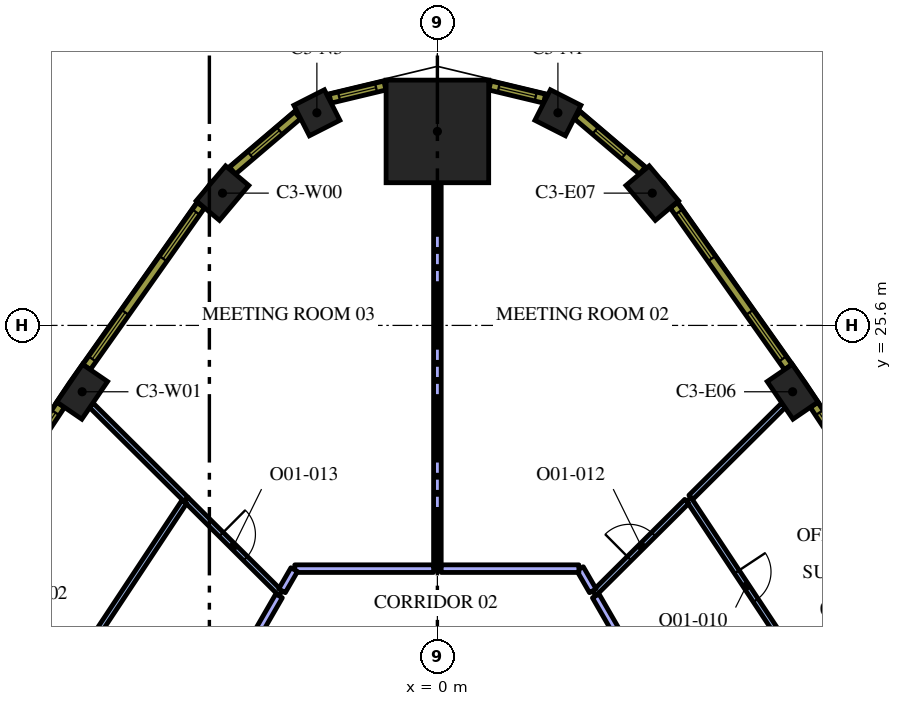
"""IFC4 building model, lengths in metres.
Left out: names, types, materials, properties, quantities, classifications, styles, units other than length and angle.
Written with IfcOpenShell. Run it as: python <this file> out.ifc"""

import sys

from ifc_helpers import new_model, si_unit, direction, frame, frame_2d, origin, origin_2d, place, context, subcontext, project, spatial, rectangle, extrude, element, fill, save


model = new_model("IFC4")
c1 = context("Model", 3, precision=1e-05, world=origin(), true_north=direction((0.0, 1.0)))
c2 = subcontext(c1, "Body", "Model", "MODEL_VIEW")
j1 = project(units=[si_unit("LENGTHUNIT", "METRE"), si_unit("PLANEANGLEUNIT", "RADIAN")], contexts=[c1])
p1 = place(None, origin())
s1 = spatial("IfcSite", under=j1, at=p1, CompositionType="ELEMENT")
p2 = place(p1, origin())
s2 = spatial("IfcBuilding", under=s1, at=p2, CompositionType="ELEMENT")
p3 = place(p2, frame((0.0, 0.0, 141.6)))
s3 = spatial("IfcBuildingStorey", under=s2, at=p3, CompositionType="ELEMENT", Elevation=141.6)
p4 = place(p3, frame((0.0, 30.704, 0.0), z_axis=(0.0, 0.0, 1.0), x_axis=(0.0, 1.0, 0.0)))
e1 = element("IfcColumn", 1, at=p4, inside=s3, PredefinedType="COLUMN", context=c2, shape_type="SweptSolid", body=[
    extrude(rectangle(XDim=2.7, YDim=2.7, at=origin_2d()), origin(), (0.0, 0.0, 1.0), 4.2),
])
for number, where, z_axis, x_axis in (
    (2, (9.348, 23.854, 0.0), (0.0, 0.0, 1.0), (-0.565, 0.825, 0.0)),
    (3, (5.654, 29.081, 0.0), (0.0, 0.0, 1.0), (-0.644, 0.765, 0.0)),
):
    element("IfcColumn", number, at=place(p3, frame(where, z_axis=z_axis, x_axis=x_axis)), inside=s3, PredefinedType="COLUMN", context=c2, shape_type="SweptSolid", body=[
        extrude(rectangle(XDim=1.2, YDim=0.8, at=origin_2d()), origin(), (0.0, 0.0, 1.0), 4.2),
    ])
for number, where, z_axis, x_axis in (
    (4, (3.171, 31.195, 0.0), (0.0, 0.0, 1.0), (-0.891, 0.453, 0.0)),
    (5, (-3.171, 31.195, 0.0), (0.0, 0.0, 1.0), (-0.891, -0.453, 0.0)),
):
    element("IfcColumn", number, at=place(p3, frame(where, z_axis=z_axis, x_axis=x_axis)), inside=s3, PredefinedType="COLUMN", context=c2, shape_type="SweptSolid", body=[
        extrude(rectangle(XDim=0.9, YDim=0.9, at=origin_2d()), origin(), (0.0, 0.0, 1.0), 4.2),
    ])
for number, where, z_axis, x_axis in (
    (6, (-5.654, 29.081, 0.0), (0.0, 0.0, 1.0), (-0.644, -0.765, 0.0)),
    (7, (-9.348, 23.854, 0.0), (0.0, 0.0, 1.0), (-0.565, -0.825, 0.0)),
):
    element("IfcColumn", number, at=place(p3, frame(where, z_axis=z_axis, x_axis=x_axis)), inside=s3, PredefinedType="COLUMN", context=c2, shape_type="SweptSolid", body=[
        extrude(rectangle(XDim=1.2, YDim=0.8, at=origin_2d()), origin(), (0.0, 0.0, 1.0), 4.2),
    ])
p5 = place(p3, frame((6.616, 21.024, 0.0), z_axis=(0.0, 0.0, 1.0), x_axis=(0.551915124006, -0.833900291338, 0.0)))
e8 = element("IfcWall", 8, at=p5, inside=s3, PredefinedType="PARTITIONING", context=c2, shape_type="SweptSolid", body=[
    extrude(rectangle(XDim=5.488, YDim=0.15, at=frame_2d((2.744, 0.0))), origin(), (0.0, 0.0, 1.0), 3.15),
])
p6 = place(p5, frame((2.288, 0.0, 0.0)))
e9 = element("IfcOpeningElement", 9, at=p6, cuts=e8, PredefinedType="OPENING", context=c2, shape_type="SweptSolid", body=[
    extrude(rectangle(XDim=0.9, YDim=2.1, at=frame_2d((0.45, 1.05))), frame((0.0, 0.085, 0.0), z_axis=(0.0, -1.0, 0.0), x_axis=(1.0, 0.0, 0.0)), (0.0, 0.0, 1.0), 0.17),
])
p7 = place(p3, frame((6.67, 21.078, 0.0), z_axis=(0.0, 0.0, 1.0), x_axis=(0.709236178776, 0.704970951681, 0.0)))
e10 = element("IfcWall", 10, at=p7, inside=s3, PredefinedType="PARTITIONING", context=c2, shape_type="SweptSolid", body=[
    extrude(rectangle(XDim=3.434, YDim=0.15, at=frame_2d((1.717, 0.0))), origin(), (0.0, 0.0, 1.0), 3.15),
])
p8 = place(p3, frame((4.128, 18.55, 0.0), z_axis=(0.0, 0.0, 1.0), x_axis=(0.709237676072, 0.704969445324, 0.0)))
e11 = element("IfcWall", 11, at=p8, inside=s3, PredefinedType="PARTITIONING", context=c2, shape_type="SweptSolid", body=[
    extrude(rectangle(XDim=3.432, YDim=0.15, at=frame_2d((1.716, 0.0))), origin(), (0.0, 0.0, 1.0), 3.15),
])
p9 = place(p8, frame((1.3, 0.0, 0.0)))
e12 = element("IfcOpeningElement", 12, at=p9, cuts=e11, PredefinedType="OPENING", context=c2, shape_type="SweptSolid", body=[
    extrude(rectangle(XDim=0.9, YDim=2.1, at=frame_2d((0.45, 1.05))), frame((0.0, 0.085, 0.0), z_axis=(0.0, -1.0, 0.0), x_axis=(1.0, 0.0, 0.0)), (0.0, 0.0, 1.0), 0.17),
])
p10 = place(p3, frame((8.611, 10.785, 0.0), z_axis=(0.0, 0.0, 1.0), x_axis=(-0.499987928593, 0.866032373102, 0.0)))
e13 = element("IfcWall", 13, at=p10, inside=s3, PredefinedType="PARTITIONING", context=c2, shape_type="SweptSolid", body=[
    extrude(rectangle(XDim=8.889, YDim=0.2, at=frame_2d((4.445, 0.0))), origin(), (0.0, 0.0, 1.0), 3.15),
])
p11 = place(p3, frame((0.0, 19.2, 0.0), z_axis=(0.0, 0.0, 1.0), x_axis=(0.0, 1.0, 0.0)))
e14 = element("IfcWall", 14, at=p11, inside=s3, PredefinedType="PARTITIONING", context=c2, shape_type="SweptSolid", body=[
    extrude(rectangle(XDim=10.154, YDim=0.2, at=frame_2d((5.077, 0.0))), origin(), (0.0, 0.0, 1.0), 3.15),
])
p12 = place(p3, frame((4.089, 18.617, 0.0), z_axis=(0.0, 0.0, 1.0), x_axis=(-0.500120377296, 0.865955892764, 0.0)))
e15 = element("IfcWall", 15, at=p12, inside=s3, PredefinedType="PARTITIONING", context=c2, shape_type="SweptSolid", body=[
    extrude(rectangle(XDim=0.673, YDim=0.2, at=frame_2d((0.336, 0.0))), origin(), (0.0, 0.0, 1.0), 3.15),
])
p13 = place(p3, frame((3.723, 19.2, 0.0), z_axis=(0.0, 0.0, 1.0), x_axis=(-1.0, 0.0, 0.0)))
e16 = element("IfcWall", 16, at=p13, inside=s3, PredefinedType="PARTITIONING", context=c2, shape_type="SweptSolid", body=[
    extrude(rectangle(XDim=3.623, YDim=0.2, at=frame_2d((1.812, 0.0))), origin(), (0.0, 0.0, 1.0), 3.15),
])
p14 = place(p3, frame((-6.613, 21.021, 0.0), z_axis=(0.0, 0.0, 1.0), x_axis=(-0.709222036241, 0.704985179497, 0.0)))
e17 = element("IfcWall", 17, at=p14, inside=s3, PredefinedType="PARTITIONING", context=c2, shape_type="SweptSolid", body=[
    extrude(rectangle(XDim=3.515, YDim=0.15, at=frame_2d((1.757, 0.0))), origin(), (0.0, 0.0, 1.0), 3.15),
])
p15 = place(p3, frame((-6.619, 21.027, 0.0), z_axis=(0.0, 0.0, 1.0), x_axis=(0.709188943058, -0.705018470002, 0.0)))
e18 = element("IfcWall", 18, at=p15, inside=s3, PredefinedType="PARTITIONING", context=c2, shape_type="SweptSolid", body=[
    extrude(rectangle(XDim=3.512, YDim=0.15, at=frame_2d((1.756, 0.0))), origin(), (0.0, 0.0, 1.0), 3.15),
])
p16 = place(p15, frame((1.312, 0.0, 0.0)))
e19 = element("IfcOpeningElement", 19, at=p16, cuts=e18, PredefinedType="OPENING", context=c2, shape_type="SweptSolid", body=[
    extrude(rectangle(XDim=0.9, YDim=2.1, at=frame_2d((0.45, 1.05))), frame((0.0, 0.085, 0.0), z_axis=(0.0, -1.0, 0.0), x_axis=(1.0, 0.0, 0.0)), (0.0, 0.0, 1.0), 0.17),
])
p17 = place(p3, frame((-0.1, 19.2, 0.0), z_axis=(0.0, 0.0, 1.0), x_axis=(-1.0, 0.0, 0.0)))
e20 = element("IfcWall", 20, at=p17, inside=s3, PredefinedType="PARTITIONING", context=c2, shape_type="SweptSolid", body=[
    extrude(rectangle(XDim=3.653, YDim=0.2, at=frame_2d((1.826, 0.0))), origin(), (0.0, 0.0, 1.0), 3.15),
])
p18 = place(p3, frame((-3.768, 19.174, 0.0), z_axis=(0.0, 0.0, 1.0), x_axis=(-0.499897828833, -0.8660843843, 0.0)))
e21 = element("IfcWall", 21, at=p18, inside=s3, PredefinedType="PARTITIONING", context=c2, shape_type="SweptSolid", body=[
    extrude(rectangle(XDim=0.643, YDim=0.2, at=frame_2d((0.321, 0.0))), origin(), (0.0, 0.0, 1.0), 3.15),
])
p19 = place(p3, frame((-6.658, 20.96, 0.0), z_axis=(0.0, 0.0, 1.0), x_axis=(-0.551907039463, -0.833905642019, 0.0)))
e22 = element("IfcWall", 22, at=p19, inside=s3, PredefinedType="PARTITIONING", context=c2, shape_type="SweptSolid", body=[
    extrude(rectangle(XDim=5.412, YDim=0.15, at=frame_2d((2.706, 0.0))), origin(), (0.0, 0.0, 1.0), 3.15),
])
p20 = place(p3, frame((-4.167, 18.483, 0.0), z_axis=(0.0, 0.0, 1.0), x_axis=(-0.499974340325, -0.866040217898, 0.0)))
e23 = element("IfcWall", 23, at=p20, inside=s3, PredefinedType="PARTITIONING", context=c2, shape_type="SweptSolid", body=[
    extrude(rectangle(XDim=8.894, YDim=0.2, at=frame_2d((4.447, 0.0))), origin(), (0.0, 0.0, 1.0), 3.15),
])
p21 = place(p3, frame((12.783, 19.171, 0.0), z_axis=(0.0, 0.0, 1.0), x_axis=(-0.551892811511, 0.833915058386, 0.0)))
e24 = element("IfcWall", 24, at=p21, inside=s3, PredefinedType="SOLIDWALL", context=c2, shape_type="SweptSolid", body=[
    extrude(rectangle(XDim=5.204, YDim=0.24, at=frame_2d((2.602, 0.0))), origin(), (0.0, 0.0, 1.0), 3.95),
])
p22 = place(p21, frame((0.248, 0.0, 0.9)))
e25 = element("IfcOpeningElement", 25, at=p22, cuts=e24, PredefinedType="OPENING", context=c2, shape_type="SweptSolid", body=[
    extrude(rectangle(XDim=1.5, YDim=2.55, at=frame_2d((0.75, 1.275))), frame((0.0, 0.13, 0.0), z_axis=(0.0, -1.0, 0.0), x_axis=(1.0, 0.0, 0.0)), (0.0, 0.0, 1.0), 0.26),
])
p23 = place(p21, frame((3.455, 0.0, 0.9)))
e26 = element("IfcOpeningElement", 26, at=p23, cuts=e24, PredefinedType="OPENING", context=c2, shape_type="SweptSolid", body=[
    extrude(rectangle(XDim=1.5, YDim=2.55, at=frame_2d((0.75, 1.275))), frame((0.0, 0.13, 0.0), z_axis=(0.0, -1.0, 0.0), x_axis=(1.0, 0.0, 0.0)), (0.0, 0.0, 1.0), 0.26),
])
p24 = place(p3, frame((9.231, 24.504, 0.0), z_axis=(0.0, 0.0, 1.0), x_axis=(-0.577115207679, 0.816662743772, 0.0)))
e27 = element("IfcWall", 27, at=p24, inside=s3, PredefinedType="SOLIDWALL", context=c2, shape_type="SweptSolid", body=[
    extrude(rectangle(XDim=5.213, YDim=0.24, at=frame_2d((2.606, 0.0))), origin(), (0.0, 0.0, 1.0), 3.95),
])
p25 = place(p24, frame((0.261, 0.0, 0.9)))
e28 = element("IfcOpeningElement", 28, at=p25, cuts=e27, PredefinedType="OPENING", context=c2, shape_type="SweptSolid", body=[
    extrude(rectangle(XDim=1.5, YDim=2.55, at=frame_2d((0.75, 1.275))), frame((0.0, 0.13, 0.0), z_axis=(0.0, -1.0, 0.0), x_axis=(1.0, 0.0, 0.0)), (0.0, 0.0, 1.0), 0.26),
])
p26 = place(p24, frame((3.492, 0.0, 0.9)))
e29 = element("IfcOpeningElement", 29, at=p26, cuts=e27, PredefinedType="OPENING", context=c2, shape_type="SweptSolid", body=[
    extrude(rectangle(XDim=1.5, YDim=2.55, at=frame_2d((0.75, 1.275))), frame((0.0, 0.13, 0.0), z_axis=(0.0, -1.0, 0.0), x_axis=(1.0, 0.0, 0.0)), (0.0, 0.0, 1.0), 0.26),
])
p27 = place(p3, frame((5.392, 29.672, 0.0), z_axis=(0.0, 0.0, 1.0), x_axis=(-0.761419744247, 0.648259186645, 0.0)))
e30 = element("IfcWall", 30, at=p27, inside=s3, PredefinedType="SOLIDWALL", context=c2, shape_type="SweptSolid", body=[
    extrude(rectangle(XDim=2.25, YDim=0.24, at=frame_2d((1.125, 0.0))), origin(), (0.0, 0.0, 1.0), 3.95),
])
p28 = place(p27, frame((0.625, 0.0, 0.9)))
e31 = element("IfcOpeningElement", 31, at=p28, cuts=e30, PredefinedType="OPENING", context=c2, shape_type="SweptSolid", body=[
    extrude(rectangle(XDim=1.0, YDim=2.55, at=frame_2d((0.5, 1.275))), frame((0.0, 0.13, 0.0), z_axis=(0.0, -1.0, 0.0), x_axis=(1.0, 0.0, 0.0)), (0.0, 0.0, 1.0), 0.26),
])
p29 = place(p3, frame((2.821, 31.566, 0.0), z_axis=(0.0, 0.0, 1.0), x_axis=(-0.972479955788, 0.232986556673, 0.0)))
e32 = element("IfcWall", 32, at=p29, inside=s3, PredefinedType="SOLIDWALL", context=c2, shape_type="SweptSolid", body=[
    extrude(rectangle(XDim=1.482, YDim=0.24, at=frame_2d((0.741, 0.0))), origin(), (0.0, 0.0, 1.0), 3.95),
])
p30 = place(p29, frame((0.241, 0.0, 0.9)))
e33 = element("IfcOpeningElement", 33, at=p30, cuts=e32, PredefinedType="OPENING", context=c2, shape_type="SweptSolid", body=[
    extrude(rectangle(XDim=1.0, YDim=2.55, at=frame_2d((0.5, 1.275))), frame((0.0, 0.13, 0.0), z_axis=(0.0, -1.0, 0.0), x_axis=(1.0, 0.0, 0.0)), (0.0, 0.0, 1.0), 0.26),
])
p31 = place(p3, frame((-1.38, 31.912, 0.0), z_axis=(0.0, 0.0, 1.0), x_axis=(-0.972479955788, -0.232986556673, 0.0)))
e34 = element("IfcWall", 34, at=p31, inside=s3, PredefinedType="SOLIDWALL", context=c2, shape_type="SweptSolid", body=[
    extrude(rectangle(XDim=1.482, YDim=0.24, at=frame_2d((0.741, 0.0))), origin(), (0.0, 0.0, 1.0), 3.95),
])
p32 = place(p31, frame((0.241, 0.0, 0.9)))
e35 = element("IfcOpeningElement", 35, at=p32, cuts=e34, PredefinedType="OPENING", context=c2, shape_type="SweptSolid", body=[
    extrude(rectangle(XDim=1.0, YDim=2.55, at=frame_2d((0.5, 1.275))), frame((0.0, 0.13, 0.0), z_axis=(0.0, -1.0, 0.0), x_axis=(1.0, 0.0, 0.0)), (0.0, 0.0, 1.0), 0.26),
])
p33 = place(p3, frame((-3.678, 31.131, 0.0), z_axis=(0.0, 0.0, 1.0), x_axis=(-0.761419744247, -0.648259186645, 0.0)))
e36 = element("IfcWall", 36, at=p33, inside=s3, PredefinedType="SOLIDWALL", context=c2, shape_type="SweptSolid", body=[
    extrude(rectangle(XDim=2.25, YDim=0.24, at=frame_2d((1.125, 0.0))), origin(), (0.0, 0.0, 1.0), 3.95),
])
p34 = place(p33, frame((0.625, 0.0, 0.9)))
e37 = element("IfcOpeningElement", 37, at=p34, cuts=e36, PredefinedType="OPENING", context=c2, shape_type="SweptSolid", body=[
    extrude(rectangle(XDim=1.0, YDim=2.55, at=frame_2d((0.5, 1.275))), frame((0.0, 0.13, 0.0), z_axis=(0.0, -1.0, 0.0), x_axis=(1.0, 0.0, 0.0)), (0.0, 0.0, 1.0), 0.26),
])
p35 = place(p3, frame((-6.223, 28.762, 0.0), z_axis=(0.0, 0.0, 1.0), x_axis=(-0.577115207679, -0.816662743772, 0.0)))
e38 = element("IfcWall", 38, at=p35, inside=s3, PredefinedType="SOLIDWALL", context=c2, shape_type="SweptSolid", body=[
    extrude(rectangle(XDim=5.213, YDim=0.24, at=frame_2d((2.606, 0.0))), origin(), (0.0, 0.0, 1.0), 3.95),
])
p36 = place(p35, frame((0.221, 0.0, 0.9)))
e39 = element("IfcOpeningElement", 39, at=p36, cuts=e38, PredefinedType="OPENING", context=c2, shape_type="SweptSolid", body=[
    extrude(rectangle(XDim=1.5, YDim=2.55, at=frame_2d((0.75, 1.275))), frame((0.0, 0.13, 0.0), z_axis=(0.0, -1.0, 0.0), x_axis=(1.0, 0.0, 0.0)), (0.0, 0.0, 1.0), 0.26),
])
p37 = place(p35, frame((3.452, 0.0, 0.9)))
e40 = element("IfcOpeningElement", 40, at=p37, cuts=e38, PredefinedType="OPENING", context=c2, shape_type="SweptSolid", body=[
    extrude(rectangle(XDim=1.5, YDim=2.55, at=frame_2d((0.75, 1.275))), frame((0.0, 0.13, 0.0), z_axis=(0.0, -1.0, 0.0), x_axis=(1.0, 0.0, 0.0)), (0.0, 0.0, 1.0), 0.26),
])
p38 = place(p3, frame((-9.911, 23.51, 0.0), z_axis=(0.0, 0.0, 1.0), x_axis=(-0.551892811511, -0.833915058386, 0.0)))
e41 = element("IfcWall", 41, at=p38, inside=s3, PredefinedType="SOLIDWALL", context=c2, shape_type="SweptSolid", body=[
    extrude(rectangle(XDim=5.204, YDim=0.24, at=frame_2d((2.602, 0.0))), origin(), (0.0, 0.0, 1.0), 3.95),
])
p39 = place(p38, frame((0.248, 0.0, 0.9)))
e42 = element("IfcOpeningElement", 42, at=p39, cuts=e41, PredefinedType="OPENING", context=c2, shape_type="SweptSolid", body=[
    extrude(rectangle(XDim=1.5, YDim=2.55, at=frame_2d((0.75, 1.275))), frame((0.0, 0.13, 0.0), z_axis=(0.0, -1.0, 0.0), x_axis=(1.0, 0.0, 0.0)), (0.0, 0.0, 1.0), 0.26),
])
p40 = place(p38, frame((3.455, 0.0, 0.9)))
e43 = element("IfcOpeningElement", 43, at=p40, cuts=e41, PredefinedType="OPENING", context=c2, shape_type="SweptSolid", body=[
    extrude(rectangle(XDim=1.5, YDim=2.55, at=frame_2d((0.75, 1.275))), frame((0.0, 0.13, 0.0), z_axis=(0.0, -1.0, 0.0), x_axis=(1.0, 0.0, 0.0)), (0.0, 0.0, 1.0), 0.26),
])
p41 = place(p6, origin())
e44 = element("IfcDoor", 44, at=p41, inside=s3, OperationType="SINGLE_SWING_LEFT", PredefinedType="DOOR", context=c2, shape_type="SweptSolid", body=[
    extrude(rectangle(XDim=0.9, YDim=2.1, at=frame_2d((0.45, 1.05))), frame((0.0, 0.025, 0.0), z_axis=(0.0, -1.0, 0.0), x_axis=(1.0, 0.0, 0.0)), (0.0, 0.0, 1.0), 0.05),
])
fill(e9, e44)
p42 = place(p9, origin())
e45 = element("IfcDoor", 45, at=p42, inside=s3, OperationType="SINGLE_SWING_RIGHT", PredefinedType="DOOR", context=c2, shape_type="SweptSolid", body=[
    extrude(rectangle(XDim=0.9, YDim=2.1, at=frame_2d((0.45, 1.05))), frame((0.0, 0.025, 0.0), z_axis=(0.0, -1.0, 0.0), x_axis=(1.0, 0.0, 0.0)), (0.0, 0.0, 1.0), 0.05),
])
fill(e12, e45)
p43 = place(p16, origin())
e46 = element("IfcDoor", 46, at=p43, inside=s3, OperationType="SINGLE_SWING_RIGHT", PredefinedType="DOOR", context=c2, shape_type="SweptSolid", body=[
    extrude(rectangle(XDim=0.9, YDim=2.1, at=frame_2d((0.45, 1.05))), frame((0.0, 0.025, 0.0), z_axis=(0.0, -1.0, 0.0), x_axis=(1.0, 0.0, 0.0)), (0.0, 0.0, 1.0), 0.05),
])
fill(e19, e46)
p44 = place(p23, origin())
e47 = element("IfcWindow", 47, at=p44, inside=s3, PartitioningType="SINGLE_PANEL", PredefinedType="WINDOW", context=c2, shape_type="SweptSolid", body=[
    extrude(rectangle(XDim=1.5, YDim=2.55, at=frame_2d((0.75, 1.275))), frame((0.0, 0.04, 0.0), z_axis=(0.0, -1.0, 0.0), x_axis=(1.0, 0.0, 0.0)), (0.0, 0.0, 1.0), 0.06),
])
fill(e26, e47)
p45 = place(p25, origin())
e48 = element("IfcWindow", 48, at=p45, inside=s3, PartitioningType="SINGLE_PANEL", PredefinedType="WINDOW", context=c2, shape_type="SweptSolid", body=[
    extrude(rectangle(XDim=1.5, YDim=2.55, at=frame_2d((0.75, 1.275))), frame((0.0, 0.04, 0.0), z_axis=(0.0, -1.0, 0.0), x_axis=(1.0, 0.0, 0.0)), (0.0, 0.0, 1.0), 0.06),
])
fill(e28, e48)
p46 = place(p26, origin())
e49 = element("IfcWindow", 49, at=p46, inside=s3, PartitioningType="SINGLE_PANEL", PredefinedType="WINDOW", context=c2, shape_type="SweptSolid", body=[
    extrude(rectangle(XDim=1.5, YDim=2.55, at=frame_2d((0.75, 1.275))), frame((0.0, 0.04, 0.0), z_axis=(0.0, -1.0, 0.0), x_axis=(1.0, 0.0, 0.0)), (0.0, 0.0, 1.0), 0.06),
])
fill(e29, e49)
p47 = place(p28, origin())
e50 = element("IfcWindow", 50, at=p47, inside=s3, PartitioningType="SINGLE_PANEL", PredefinedType="WINDOW", context=c2, shape_type="SweptSolid", body=[
    extrude(rectangle(XDim=1.0, YDim=2.55, at=frame_2d((0.5, 1.275))), frame((0.0, 0.04, 0.0), z_axis=(0.0, -1.0, 0.0), x_axis=(1.0, 0.0, 0.0)), (0.0, 0.0, 1.0), 0.06),
])
fill(e31, e50)
p48 = place(p30, origin())
e51 = element("IfcWindow", 51, at=p48, inside=s3, PartitioningType="SINGLE_PANEL", PredefinedType="WINDOW", context=c2, shape_type="SweptSolid", body=[
    extrude(rectangle(XDim=1.0, YDim=2.55, at=frame_2d((0.5, 1.275))), frame((0.0, 0.04, 0.0), z_axis=(0.0, -1.0, 0.0), x_axis=(1.0, 0.0, 0.0)), (0.0, 0.0, 1.0), 0.06),
])
fill(e33, e51)
p49 = place(p32, origin())
e52 = element("IfcWindow", 52, at=p49, inside=s3, PartitioningType="SINGLE_PANEL", PredefinedType="WINDOW", context=c2, shape_type="SweptSolid", body=[
    extrude(rectangle(XDim=1.0, YDim=2.55, at=frame_2d((0.5, 1.275))), frame((0.0, 0.04, 0.0), z_axis=(0.0, -1.0, 0.0), x_axis=(1.0, 0.0, 0.0)), (0.0, 0.0, 1.0), 0.06),
])
fill(e35, e52)
p50 = place(p34, origin())
e53 = element("IfcWindow", 53, at=p50, inside=s3, PartitioningType="SINGLE_PANEL", PredefinedType="WINDOW", context=c2, shape_type="SweptSolid", body=[
    extrude(rectangle(XDim=1.0, YDim=2.55, at=frame_2d((0.5, 1.275))), frame((0.0, 0.04, 0.0), z_axis=(0.0, -1.0, 0.0), x_axis=(1.0, 0.0, 0.0)), (0.0, 0.0, 1.0), 0.06),
])
fill(e37, e53)
p51 = place(p36, origin())
e54 = element("IfcWindow", 54, at=p51, inside=s3, PartitioningType="SINGLE_PANEL", PredefinedType="WINDOW", context=c2, shape_type="SweptSolid", body=[
    extrude(rectangle(XDim=1.5, YDim=2.55, at=frame_2d((0.75, 1.275))), frame((0.0, 0.04, 0.0), z_axis=(0.0, -1.0, 0.0), x_axis=(1.0, 0.0, 0.0)), (0.0, 0.0, 1.0), 0.06),
])
fill(e39, e54)
p52 = place(p37, origin())
e55 = element("IfcWindow", 55, at=p52, inside=s3, PartitioningType="SINGLE_PANEL", PredefinedType="WINDOW", context=c2, shape_type="SweptSolid", body=[
    extrude(rectangle(XDim=1.5, YDim=2.55, at=frame_2d((0.75, 1.275))), frame((0.0, 0.04, 0.0), z_axis=(0.0, -1.0, 0.0), x_axis=(1.0, 0.0, 0.0)), (0.0, 0.0, 1.0), 0.06),
])
fill(e40, e55)
p53 = place(p39, origin())
e56 = element("IfcWindow", 56, at=p53, inside=s3, PartitioningType="SINGLE_PANEL", PredefinedType="WINDOW", context=c2, shape_type="SweptSolid", body=[
    extrude(rectangle(XDim=1.5, YDim=2.55, at=frame_2d((0.75, 1.275))), frame((0.0, 0.04, 0.0), z_axis=(0.0, -1.0, 0.0), x_axis=(1.0, 0.0, 0.0)), (0.0, 0.0, 1.0), 0.06),
])
fill(e42, e56)
save(model, sys.argv[1])
